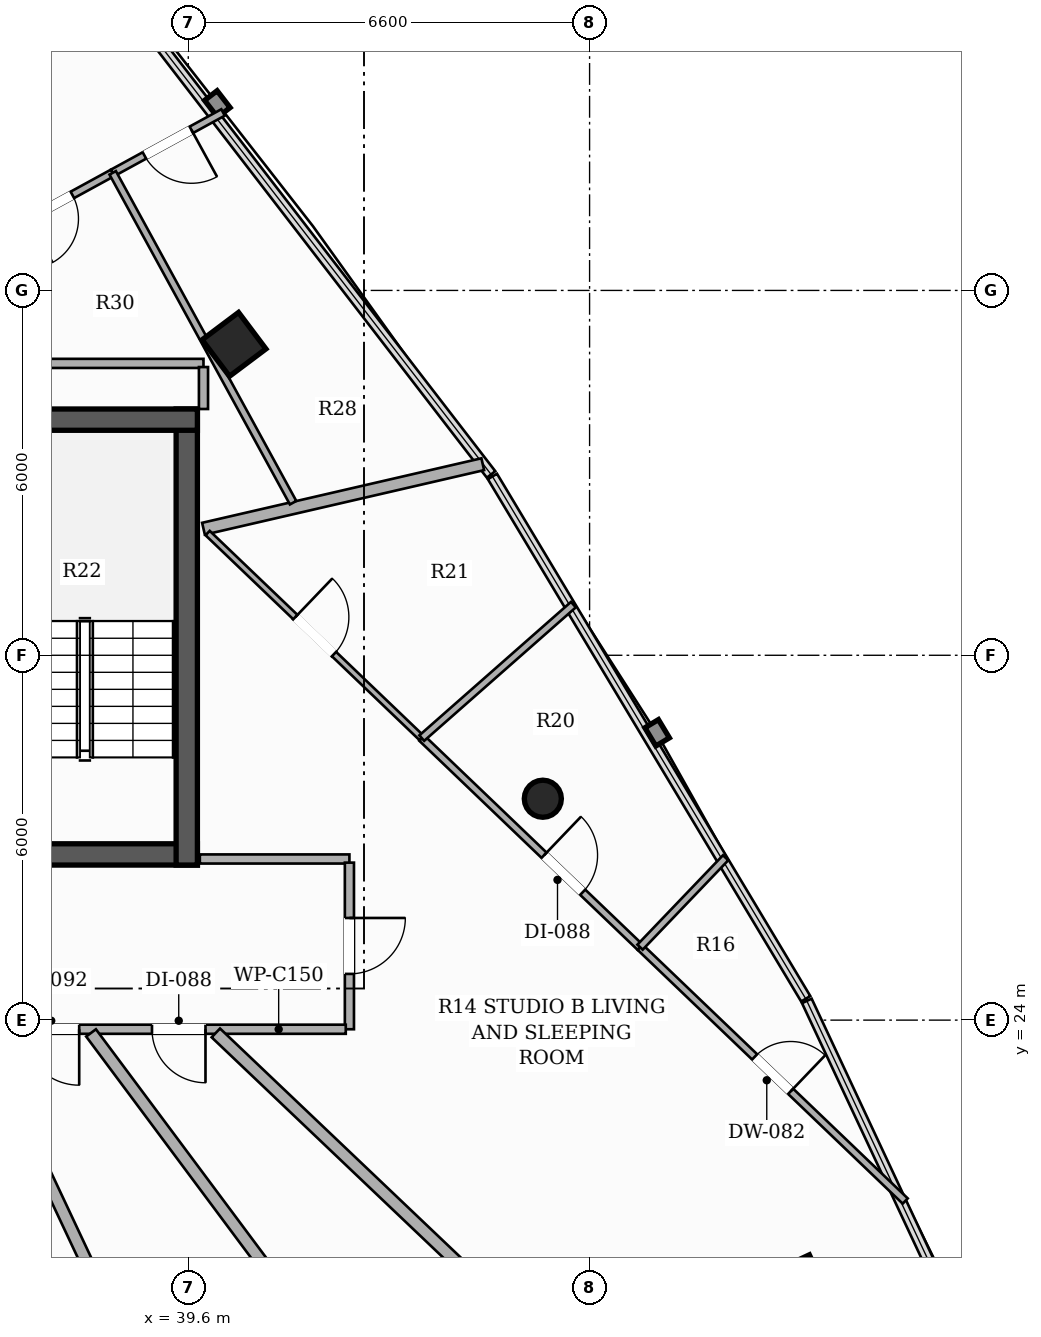
"""IFC4 building model, lengths in metres.
Left out: names, types, materials, properties, quantities, classifications, styles, units other than length and angle.
Written with IfcOpenShell. Run it as: python <this file> out.ifc"""

import sys

from ifc_helpers import new_model, si_unit, direction, frame, frame_2d, origin, origin_2d, place, context, subcontext, project, spatial, rectangle, hollow_rectangle, hollow_circle, extrude, element, fill, save


model = new_model("IFC4")
c1 = context("Model", 3, precision=1e-05, world=origin(), true_north=direction((0.0, 1.0)))
c2 = subcontext(c1, "Body", "Model", "MODEL_VIEW")
j1 = project(units=[si_unit("LENGTHUNIT", "METRE"), si_unit("PLANEANGLEUNIT", "RADIAN")], contexts=[c1])
p1 = place(None, origin())
s1 = spatial("IfcSite", under=j1, at=p1, CompositionType="ELEMENT")
p2 = place(p1, origin())
s2 = spatial("IfcBuilding", under=s1, at=p2, CompositionType="ELEMENT")
p3 = place(p2, frame((0.0, 0.0, 216.2)))
s3 = spatial("IfcBuildingStorey", under=s2, at=p3, CompositionType="ELEMENT", Elevation=216.2)
p4 = place(p3, frame((26.25, 26.725, 0.0), z_axis=(0.0, 0.0, 1.0), x_axis=(1.0, 0.0, 0.0)))
e1 = element("IfcWall", 1, at=p4, inside=s3, PredefinedType="SHEAR", context=c2, shape_type="SweptSolid", body=[
    extrude(rectangle(XDim=13.5, YDim=0.35, at=frame_2d((6.75, 0.0))), origin(), (0.0, 0.0, 1.0), 3.3),
])
p5 = place(p4, frame((4.35, 0.0, 0.0)))
e2 = element("IfcOpeningElement", 2, at=p5, cuts=e1, PredefinedType="OPENING", context=c2, shape_type="SweptSolid", body=[
    extrude(rectangle(XDim=1.05, YDim=2.15, at=frame_2d((0.525, 1.075))), frame((0.0, 0.185, 0.0), z_axis=(0.0, -1.0, 0.0), x_axis=(1.0, 0.0, 0.0)), (0.0, 0.0, 1.0), 0.37),
])
p6 = place(p4, frame((8.3, 0.0, 0.0)))
e3 = element("IfcOpeningElement", 3, at=p6, cuts=e1, PredefinedType="OPENING", context=c2, shape_type="SweptSolid", body=[
    extrude(rectangle(XDim=1.05, YDim=2.15, at=frame_2d((0.525, 1.075))), frame((0.0, 0.185, 0.0), z_axis=(0.0, -1.0, 0.0), x_axis=(1.0, 0.0, 0.0)), (0.0, 0.0, 1.0), 0.37),
])
p7 = place(p3, frame((39.575, 26.55, 0.0), z_axis=(0.0, 0.0, 1.0), x_axis=(0.0, 1.0, 0.0)))
e4 = element("IfcWall", 4, at=p7, inside=s3, PredefinedType="SHEAR", context=c2, shape_type="SweptSolid", body=[
    extrude(rectangle(XDim=7.5, YDim=0.35, at=frame_2d((3.75, 0.0))), origin(), (0.0, 0.0, 1.0), 3.3),
])
p8 = place(p3, frame((36.15, 33.875, 0.0), z_axis=(0.0, 0.0, 1.0), x_axis=(1.0, 0.0, 0.0)))
e5 = element("IfcWall", 5, at=p8, inside=s3, PredefinedType="SHEAR", context=c2, shape_type="SweptSolid", body=[
    extrude(rectangle(XDim=3.6, YDim=0.35, at=frame_2d((1.8, 0.0))), origin(), (0.0, 0.0, 1.0), 3.3),
])
p9 = place(p3, frame((49.633, 19.642, 0.0), z_axis=(0.0, 0.0, 1.0), x_axis=(-0.422618261741, 0.906307787037, 0.0)))
e6 = element("IfcColumn", 6, at=p9, inside=s3, PredefinedType="COLUMN", context=c2, shape_type="SweptSolid", body=[
    extrude(hollow_rectangle(XDim=0.75, YDim=0.75, WallThickness=0.025, at=origin_2d()), origin(), (0.0, 0.0, 1.0), 3.3),
])
p10 = place(p3, frame((45.431, 27.641, 0.0), z_axis=(0.0, 0.0, 1.0), x_axis=(1.0, 0.0, 0.0)))
e7 = element("IfcColumn", 7, at=p10, inside=s3, PredefinedType="COLUMN", context=c2, shape_type="SweptSolid", body=[
    extrude(hollow_circle(Radius=0.305, WallThickness=0.016, at=origin_2d()), origin(), (0.0, 0.0, 1.0), 3.3),
])
p11 = place(p3, frame((40.352, 35.113, 0.0), z_axis=(0.0, 0.0, 1.0), x_axis=(-0.600420225326, 0.799684658487, 0.0)))
e8 = element("IfcColumn", 8, at=p11, inside=s3, PredefinedType="COLUMN", context=c2, shape_type="SweptSolid", body=[
    extrude(hollow_rectangle(XDim=0.75, YDim=0.75, WallThickness=0.025, at=origin_2d()), origin(), (0.0, 0.0, 1.0), 3.3),
])
p12 = place(p3, frame((39.79, 26.65, 0.0), z_axis=(0.0, 0.0, 1.0), x_axis=(1.0, 0.0, 0.0)))
e9 = element("IfcWall", 9, at=p12, inside=s3, PredefinedType="PARTITIONING", context=c2, shape_type="SweptSolid", body=[
    extrude(rectangle(XDim=2.46, YDim=0.15, at=frame_2d((1.23, 0.0))), origin(), (0.0, 0.0, 1.0), 2.565),
])
p13 = place(p3, frame((42.25, 26.59, 0.0), z_axis=(0.0, 0.0, 1.0), x_axis=(0.0, -1.0, 0.0)))
e10 = element("IfcWall", 10, at=p13, inside=s3, PredefinedType="PARTITIONING", context=c2, shape_type="SweptSolid", body=[
    extrude(rectangle(XDim=2.74, YDim=0.15, at=frame_2d((1.37, 0.0))), origin(), (0.0, 0.0, 1.0), 2.773),
])
p14 = place(p13, frame((0.91, 0.0, 0.0)))
e11 = element("IfcOpeningElement", 11, at=p14, cuts=e10, PredefinedType="OPENING", context=c2, shape_type="SweptSolid", body=[
    extrude(rectangle(XDim=0.92, YDim=2.15, at=frame_2d((0.46, 1.075))), frame((0.0, 0.085, 0.0), z_axis=(0.0, -1.0, 0.0), x_axis=(1.0, 0.0, 0.0)), (0.0, 0.0, 1.0), 0.17),
])
p15 = place(p3, frame((42.19, 23.85, 0.0), z_axis=(0.0, 0.0, 1.0), x_axis=(-1.0, 0.0, 0.0)))
e12 = element("IfcWall", 12, at=p15, inside=s3, PredefinedType="PARTITIONING", context=c2, shape_type="SweptSolid", body=[
    extrude(rectangle(XDim=8.263, YDim=0.15, at=frame_2d((4.131, 0.0))), origin(), (0.0, 0.0, 1.0), 2.565),
])
p16 = place(p15, frame((6.516, 0.0, 0.0)))
e13 = element("IfcOpeningElement", 13, at=p16, cuts=e12, PredefinedType="OPENING", context=c2, shape_type="SweptSolid", body=[
    extrude(rectangle(XDim=0.88, YDim=2.1, at=frame_2d((0.44, 1.05))), frame((0.0, 0.085, 0.0), z_axis=(0.0, -1.0, 0.0), x_axis=(1.0, 0.0, 0.0)), (0.0, 0.0, 1.0), 0.17),
])
p17 = place(p15, frame((2.307, 0.0, 0.0)))
e14 = element("IfcOpeningElement", 14, at=p17, cuts=e12, PredefinedType="OPENING", context=c2, shape_type="SweptSolid", body=[
    extrude(rectangle(XDim=0.88, YDim=2.1, at=frame_2d((0.44, 1.05))), frame((0.0, 0.085, 0.0), z_axis=(0.0, -1.0, 0.0), x_axis=(1.0, 0.0, 0.0)), (0.0, 0.0, 1.0), 0.17),
])
p18 = place(p15, frame((4.384, 0.0, 0.0)))
e15 = element("IfcOpeningElement", 15, at=p18, cuts=e12, PredefinedType="OPENING", context=c2, shape_type="SweptSolid", body=[
    extrude(rectangle(XDim=0.92, YDim=2.15, at=frame_2d((0.46, 1.075))), frame((0.0, 0.085, 0.0), z_axis=(0.0, -1.0, 0.0), x_axis=(1.0, 0.0, 0.0)), (0.0, 0.0, 1.0), 0.17),
])
p19 = place(p3, frame((36.31, 34.8, 0.0), z_axis=(0.0, 0.0, 1.0), x_axis=(1.0, 0.0, 0.0)))
e16 = element("IfcWall", 16, at=p19, inside=s3, PredefinedType="PARTITIONING", context=c2, shape_type="SweptSolid", body=[
    extrude(rectangle(XDim=3.54, YDim=0.15, at=frame_2d((1.77, 0.0))), origin(), (0.0, 0.0, 1.0), 2.425),
])
p20 = place(p3, frame((39.85, 34.74, 0.0), z_axis=(0.0, 0.0, 1.0), x_axis=(0.0, -1.0, 0.0)))
e17 = element("IfcWall", 17, at=p20, inside=s3, PredefinedType="PARTITIONING", context=c2, shape_type="SweptSolid", body=[
    extrude(rectangle(XDim=0.69, YDim=0.15, at=frame_2d((0.345, 0.0))), origin(), (0.0, 0.0, 1.0), 2.773),
])
p21 = place(p3, frame((33.958, 23.79, 0.0), z_axis=(0.0, 0.0, 1.0), x_axis=(0.521949656317, -0.852976292912, 0.0)))
e18 = element("IfcWall", 18, at=p21, inside=s3, PredefinedType="PARTITIONING", context=c2, shape_type="SweptSolid", body=[
    extrude(rectangle(XDim=7.667, YDim=0.15, at=frame_2d((3.833, 0.0))), origin(), (0.0, 0.0, 1.0), 2.773),
])
p22 = place(p3, frame((39.85, 32.081, 0.0), z_axis=(0.0, 0.0, 1.0), x_axis=(0.974339670333, 0.225082666628, 0.0)))
e19 = element("IfcWall", 19, at=p22, inside=s3, PredefinedType="PARTITIONING", context=c2, shape_type="SweptSolid", body=[
    extrude(rectangle(XDim=4.714, YDim=0.2, at=frame_2d((2.357, 0.0))), origin(), (0.0, 0.0, 1.0), 2.492),
])
p23 = place(p3, frame((56.059, 8.563, 0.0), z_axis=(0.0, 0.0, 1.0), x_axis=(-0.724518891706, 0.689254942355, 0.0)))
e20 = element("IfcWall", 20, at=p23, inside=s3, PredefinedType="PARTITIONING", context=c2, shape_type="SweptSolid", body=[
    extrude(rectangle(XDim=22.092, YDim=0.2, at=frame_2d((11.046, 0.0))), origin(), (0.0, 0.0, 1.0), 2.492),
])
p24 = place(p3, frame((36.155, 23.79, 0.0), z_axis=(0.0, 0.0, 1.0), x_axis=(0.425451226132, -0.90498135571, 0.0)))
e21 = element("IfcWall", 21, at=p24, inside=s3, PredefinedType="PARTITIONING", context=c2, shape_type="SweptSolid", body=[
    extrude(rectangle(XDim=20.266, YDim=0.2, at=frame_2d((10.133, 0.0))), origin(), (0.0, 0.0, 1.0), 2.492),
])
p25 = place(p3, frame((51.072, 6.251, 0.0), z_axis=(0.0, 0.0, 1.0), x_axis=(-0.59756139073, 0.801823162742, 0.0)))
e22 = element("IfcWall", 22, at=p25, inside=s3, PredefinedType="PARTITIONING", context=c2, shape_type="SweptSolid", body=[
    extrude(rectangle(XDim=21.874, YDim=0.2, at=frame_2d((10.937, 0.0))), origin(), (0.0, 0.0, 1.0), 2.492),
])
p26 = place(p3, frame((47.03, 25.2, 0.0), z_axis=(0.0, 0.0, 1.0), x_axis=(0.722345830301, -0.691531995968, 0.0)))
e23 = element("IfcWall", 23, at=p26, inside=s3, PredefinedType="PARTITIONING", context=c2, shape_type="SweptSolid", body=[
    extrude(rectangle(XDim=6.037, YDim=0.12, at=frame_2d((3.019, 0.0))), origin(), (0.0, 0.0, 1.0), 2.492),
])
p27 = place(p26, frame((2.609, 0.0, 0.0)))
e24 = element("IfcOpeningElement", 24, at=p27, cuts=e23, PredefinedType="OPENING", context=c2, shape_type="SweptSolid", body=[
    extrude(rectangle(XDim=0.82, YDim=2.1, at=frame_2d((0.41, 1.05))), frame((0.0, 0.07, 0.0), z_axis=(0.0, -1.0, 0.0), x_axis=(1.0, 0.0, 0.0)), (0.0, 0.0, 1.0), 0.14),
])
p28 = place(p3, frame((43.44, 28.638, 0.0), z_axis=(0.0, 0.0, 1.0), x_axis=(0.722240667523, -0.691641827954, 0.0)))
e25 = element("IfcWall", 25, at=p28, inside=s3, PredefinedType="PARTITIONING", context=c2, shape_type="SweptSolid", body=[
    extrude(rectangle(XDim=4.971, YDim=0.12, at=frame_2d((2.485, 0.0))), origin(), (0.0, 0.0, 1.0), 2.492),
])
p29 = place(p28, frame((2.785, 0.0, 0.0)))
e26 = element("IfcOpeningElement", 26, at=p29, cuts=e25, PredefinedType="OPENING", context=c2, shape_type="SweptSolid", body=[
    extrude(rectangle(XDim=0.88, YDim=2.1, at=frame_2d((0.44, 1.05))), frame((0.0, 0.07, 0.0), z_axis=(0.0, -1.0, 0.0), x_axis=(1.0, 0.0, 0.0)), (0.0, 0.0, 1.0), 0.14),
])
p30 = place(p3, frame((39.918, 32.01, 0.0), z_axis=(0.0, 0.0, 1.0), x_axis=(0.722311203135, -0.691568164266, 0.0)))
e27 = element("IfcWall", 27, at=p30, inside=s3, PredefinedType="PARTITIONING", context=c2, shape_type="SweptSolid", body=[
    extrude(rectangle(XDim=4.876, YDim=0.1, at=frame_2d((2.438, 0.0))), origin(), (0.0, 0.0, 1.0), 2.773),
])
p31 = place(p30, frame((1.998, 0.0, 0.0)))
e28 = element("IfcOpeningElement", 28, at=p31, cuts=e27, PredefinedType="OPENING", context=c2, shape_type="SweptSolid", body=[
    extrude(rectangle(XDim=0.88, YDim=2.1, at=frame_2d((0.44, 1.05))), frame((0.0, 0.06, 0.0), z_axis=(0.0, -1.0, 0.0), x_axis=(1.0, 0.0, 0.0)), (0.0, 0.0, 1.0), 0.12),
])
p32 = place(p3, frame((47.03, 25.2, 0.0), z_axis=(0.0, 0.0, 1.0), x_axis=(0.691459612883, 0.722415118717, 0.0)))
e29 = element("IfcWall", 29, at=p32, inside=s3, PredefinedType="PARTITIONING", context=c2, shape_type="SweptSolid", body=[
    extrude(rectangle(XDim=2.035, YDim=0.12, at=frame_2d((1.018, 0.0))), origin(), (0.0, 0.0, 1.0), 2.492),
])
p33 = place(p3, frame((43.44, 28.638, 0.0), z_axis=(0.0, 0.0, 1.0), x_axis=(0.750679989093, 0.66066599275, 0.0)))
e30 = element("IfcWall", 30, at=p33, inside=s3, PredefinedType="PARTITIONING", context=c2, shape_type="SweptSolid", body=[
    extrude(rectangle(XDim=3.323, YDim=0.12, at=frame_2d((1.661, 0.0))), origin(), (0.0, 0.0, 1.0), 2.492),
])
p34 = place(p3, frame((38.357, 37.934, 0.0), z_axis=(0.0, 0.0, 1.0), x_axis=(-0.877415192217, -0.479731779714, 0.0)))
e31 = element("IfcWall", 31, at=p34, inside=s3, PredefinedType="PARTITIONING", context=c2, shape_type="SweptSolid", body=[
    extrude(rectangle(XDim=2.333, YDim=0.12, at=frame_2d((1.167, 0.0))), origin(), (0.0, 0.0, 1.0), 2.425),
])
p35 = place(p34, frame((0.756, 0.0, 0.0)))
e32 = element("IfcOpeningElement", 32, at=p35, cuts=e31, PredefinedType="OPENING", context=c2, shape_type="SweptSolid", body=[
    extrude(rectangle(XDim=0.82, YDim=2.1, at=frame_2d((0.41, 1.05))), frame((0.0, 0.07, 0.0), z_axis=(0.0, -1.0, 0.0), x_axis=(1.0, 0.0, 0.0)), (0.0, 0.0, 1.0), 0.14),
])
p36 = place(p3, frame((40.172, 38.927, 0.0), z_axis=(0.0, 0.0, 1.0), x_axis=(-0.877322236726, -0.479901753432, 0.0)))
e33 = element("IfcWall", 33, at=p36, inside=s3, PredefinedType="PARTITIONING", context=c2, shape_type="SweptSolid", body=[
    extrude(rectangle(XDim=2.069, YDim=0.12, at=frame_2d((1.035, 0.0))), origin(), (0.0, 0.0, 1.0), 3.06),
])
p37 = place(p36, frame((0.594, 0.0, 0.0)))
e34 = element("IfcOpeningElement", 34, at=p37, cuts=e33, PredefinedType="OPENING", context=c2, shape_type="SweptSolid", body=[
    extrude(rectangle(XDim=0.88, YDim=2.1, at=frame_2d((0.44, 1.05))), frame((0.0, 0.07, 0.0), z_axis=(0.0, -1.0, 0.0), x_axis=(1.0, 0.0, 0.0)), (0.0, 0.0, 1.0), 0.14),
])
p38 = place(p3, frame((38.357, 37.934, 0.0), z_axis=(0.0, 0.0, 1.0), x_axis=(0.479839410825, -0.877356335715, 0.0)))
e35 = element("IfcWall", 35, at=p38, inside=s3, PredefinedType="PARTITIONING", context=c2, shape_type="SweptSolid", body=[
    extrude(rectangle(XDim=6.183, YDim=0.12, at=frame_2d((3.092, 0.0))), origin(), (0.0, 0.0, 1.0), 2.492),
])
p39 = place(p14, origin())
e36 = element("IfcDoor", 36, at=p39, inside=s3, OperationType="SINGLE_SWING_LEFT", PredefinedType="DOOR", context=c2, shape_type="SweptSolid", body=[
    extrude(rectangle(XDim=0.92, YDim=2.15, at=frame_2d((0.46, 1.075))), frame((0.0, 0.025, 0.0), z_axis=(0.0, -1.0, 0.0), x_axis=(1.0, 0.0, 0.0)), (0.0, 0.0, 1.0), 0.05),
])
fill(e11, e36)
p40 = place(p27, origin())
e37 = element("IfcDoor", 37, at=p40, inside=s3, OperationType="SINGLE_SWING_RIGHT", PredefinedType="DOOR", context=c2, shape_type="SweptSolid", body=[
    extrude(rectangle(XDim=0.82, YDim=2.1, at=frame_2d((0.41, 1.05))), frame((0.0, 0.025, 0.0), z_axis=(0.0, -1.0, 0.0), x_axis=(1.0, 0.0, 0.0)), (0.0, 0.0, 1.0), 0.05),
])
fill(e24, e37)
p41 = place(p29, origin())
e38 = element("IfcDoor", 38, at=p41, inside=s3, OperationType="SINGLE_SWING_LEFT", PredefinedType="DOOR", context=c2, shape_type="SweptSolid", body=[
    extrude(rectangle(XDim=0.88, YDim=2.1, at=frame_2d((0.44, 1.05))), frame((0.0, 0.025, 0.0), z_axis=(0.0, -1.0, 0.0), x_axis=(1.0, 0.0, 0.0)), (0.0, 0.0, 1.0), 0.05),
])
fill(e26, e38)
p42 = place(p31, origin())
e39 = element("IfcDoor", 39, at=p42, inside=s3, OperationType="SINGLE_SWING_LEFT", PredefinedType="DOOR", context=c2, shape_type="SweptSolid", body=[
    extrude(rectangle(XDim=0.88, YDim=2.1, at=frame_2d((0.44, 1.05))), frame((0.0, 0.025, 0.0), z_axis=(0.0, -1.0, 0.0), x_axis=(1.0, 0.0, 0.0)), (0.0, 0.0, 1.0), 0.05),
])
fill(e28, e39)
p43 = place(p35, origin())
e40 = element("IfcDoor", 40, at=p43, inside=s3, OperationType="SINGLE_SWING_RIGHT", PredefinedType="DOOR", context=c2, shape_type="SweptSolid", body=[
    extrude(rectangle(XDim=0.82, YDim=2.1, at=frame_2d((0.41, 1.05))), frame((0.0, 0.025, 0.0), z_axis=(0.0, -1.0, 0.0), x_axis=(1.0, 0.0, 0.0)), (0.0, 0.0, 1.0), 0.05),
])
fill(e32, e40)
p44 = place(p37, origin())
e41 = element("IfcDoor", 41, at=p44, inside=s3, OperationType="SINGLE_SWING_LEFT", PredefinedType="DOOR", context=c2, shape_type="SweptSolid", body=[
    extrude(rectangle(XDim=0.88, YDim=2.1, at=frame_2d((0.44, 1.05))), frame((0.0, 0.025, 0.0), z_axis=(0.0, -1.0, 0.0), x_axis=(1.0, 0.0, 0.0)), (0.0, 0.0, 1.0), 0.05),
])
fill(e34, e41)
p45 = place(p17, origin())
e42 = element("IfcDoor", 42, at=p45, inside=s3, OperationType="SINGLE_SWING_LEFT", PredefinedType="DOOR", context=c2, shape_type="SweptSolid", body=[
    extrude(rectangle(XDim=0.88, YDim=2.1, at=frame_2d((0.44, 1.05))), frame((0.0, 0.025, 0.0), z_axis=(0.0, -1.0, 0.0), x_axis=(1.0, 0.0, 0.0)), (0.0, 0.0, 1.0), 0.05),
])
fill(e14, e42)
p46 = place(p18, origin())
e43 = element("IfcDoor", 43, at=p46, inside=s3, OperationType="SINGLE_SWING_LEFT", PredefinedType="DOOR", context=c2, shape_type="SweptSolid", body=[
    extrude(rectangle(XDim=0.92, YDim=2.15, at=frame_2d((0.46, 1.075))), frame((0.0, 0.025, 0.0), z_axis=(0.0, -1.0, 0.0), x_axis=(1.0, 0.0, 0.0)), (0.0, 0.0, 1.0), 0.05),
])
fill(e15, e43)
save(model, sys.argv[1])
